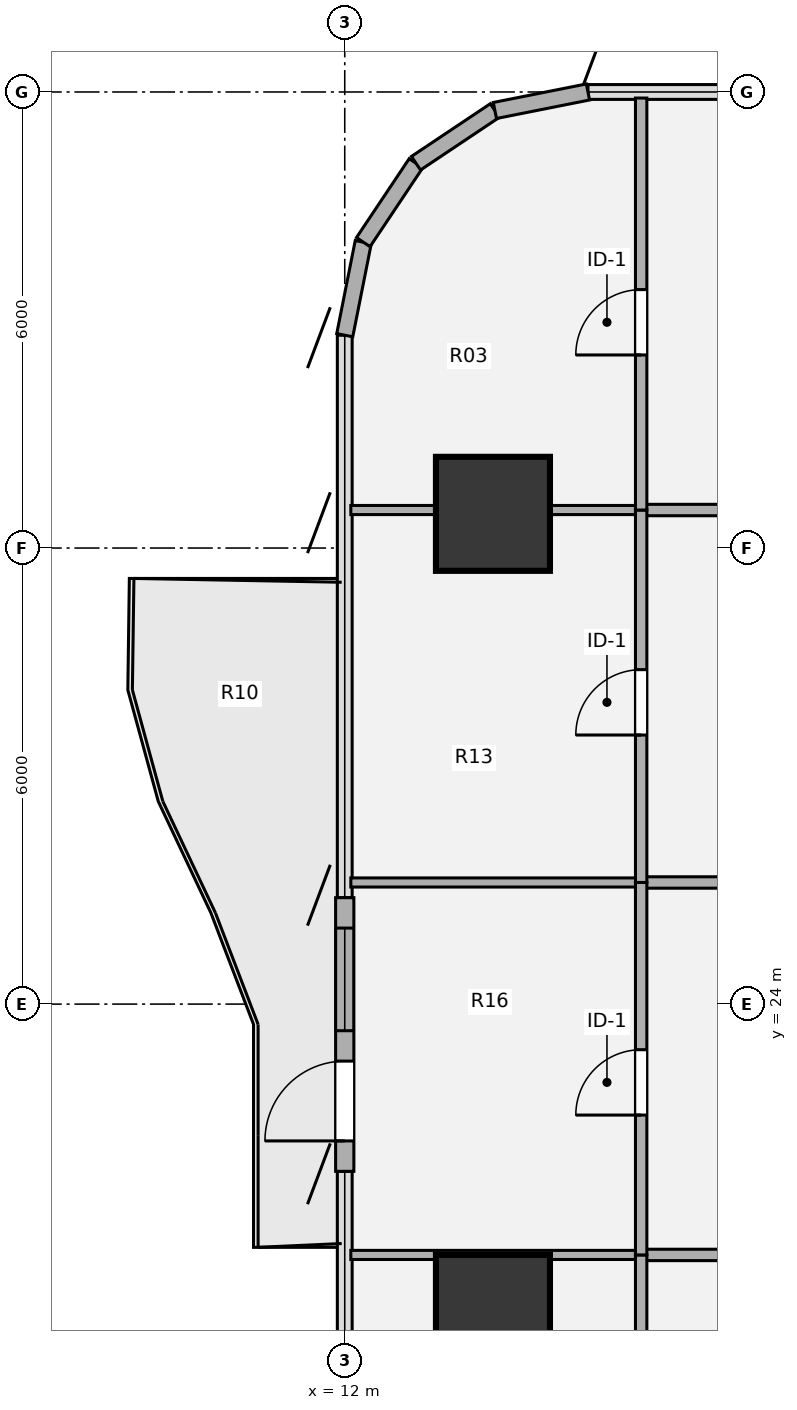
"""IFC4 building model, lengths in metres.
Left out: names, types, materials, properties, quantities, classifications, styles, units other than length and angle.
Written with IfcOpenShell. Run it as: python <this file> out.ifc"""

import sys

from ifc_helpers import new_model, si_unit, direction, frame, frame_2d, origin, origin_2d, place, context, subcontext, project, spatial, rectangle, hollow_circle, extrude, source, transform, mapped, element, fill, save


model = new_model("IFC4")
c1 = context("Model", 3, precision=1e-05, world=origin(), true_north=direction((0.0, 1.0)))
c2 = subcontext(c1, "Body", "Model", "MODEL_VIEW")
j1 = project(units=[si_unit("LENGTHUNIT", "METRE"), si_unit("PLANEANGLEUNIT", "RADIAN")], contexts=[c1])
p1 = place(None, origin())
s1 = spatial("IfcSite", under=j1, at=p1, CompositionType="ELEMENT")
p2 = place(p1, origin())
s2 = spatial("IfcBuilding", under=s1, at=p2, CompositionType="ELEMENT")
p3 = place(p2, frame((0.0, 0.0, 68.58)))
s3 = spatial("IfcBuildingStorey", under=s2, at=p3, CompositionType="ELEMENT", Elevation=68.58)
m1 = source(origin(), c2, "Body", "SweptSolid", [
    extrude(hollow_circle(Radius=0.75, WallThickness=0.05, at=origin_2d()), origin(), (0.0, 0.0, 1.0), 3.78),
])
for number, where, z_axis, x_axis in (
    (1, (13.95, 19.95, 0.0), (0.0, 0.0, 1.0), (1.0, 0.0, 0.0)),
    (2, (13.95, 30.45, 0.0), (0.0, 0.0, 1.0), (1.0, 0.0, 0.0)),
):
    element("IfcColumn", number, at=place(p3, frame(where, z_axis=z_axis, x_axis=x_axis)), inside=s3, PredefinedType="COLUMN", context=c2, shape_type="MappedRepresentation", body=[
        mapped(m1, transform((0.0, 0.0, 0.0), x_axis=(1.0, 0.0, 0.0), y_axis=(0.0, 1.0, 0.0), z_axis=(0.0, 0.0, 1.0), scale=1.0)),
    ])
p4 = place(p3, frame((12.0, 21.8, 0.0), z_axis=(0.0, 0.0, 1.0), x_axis=(0.0, 1.0, 0.0)))
e3 = element("IfcWall", 3, at=p4, inside=s3, PredefinedType="SOLIDWALL", context=c2, shape_type="SweptSolid", body=[
    extrude(rectangle(XDim=3.6, YDim=0.24, at=frame_2d((1.8, 0.0))), origin(), (0.0, 0.0, 1.0), 3.53),
])
p5 = place(p4, frame((0.4, 0.0, 0.0)))
e4 = element("IfcOpeningElement", 4, at=p5, cuts=e3, PredefinedType="OPENING", context=c2, shape_type="SweptSolid", body=[
    extrude(rectangle(XDim=1.05, YDim=2.15, at=origin_2d()), frame((0.525, 0.13, 1.075), z_axis=(0.0, -1.0, 0.0), x_axis=(1.0, 0.0, 0.0)), (0.0, 0.0, 1.0), 0.26),
])
p6 = place(p4, frame((1.85, 0.0, 0.85)))
e5 = element("IfcOpeningElement", 5, at=p6, cuts=e3, PredefinedType="OPENING", context=c2, shape_type="SweptSolid", body=[
    extrude(rectangle(XDim=1.35, YDim=1.35, at=origin_2d()), frame((0.675, 0.13, 0.675), z_axis=(0.0, -1.0, 0.0), x_axis=(1.0, 0.0, 0.0)), (0.0, 0.0, 1.0), 0.26),
])
for number, where, z_axis, x_axis in (
    (6, (12.0, 32.8, 0.0), (0.0, 0.0, 1.0), (0.195, 0.981, 0.0)),
    (7, (12.244, 34.025, 0.0), (0.0, 0.0, 1.0), (0.556, 0.831, 0.0)),
    (8, (12.937, 35.063, 0.0), (0.0, 0.0, 1.0), (0.831, 0.556, 0.0)),
    (9, (13.975, 35.756, 0.0), (0.0, 0.0, 1.0), (0.981, 0.195, 0.0)),
):
    element("IfcWall", number, at=place(p3, frame(where, z_axis=z_axis, x_axis=x_axis)), inside=s3, PredefinedType="SOLIDWALL", context=c2, shape_type="SweptSolid", body=[
        extrude(rectangle(XDim=1.249, YDim=0.215, at=frame_2d((0.624, 0.0))), origin(), (0.0, 0.0, 1.0), 3.53),
    ])
p7 = place(p3, frame((12.08, 20.7, 0.0), z_axis=(0.0, 0.0, 1.0), x_axis=(1.0, 0.0, 0.0)))
e10 = element("IfcWall", 10, at=p7, inside=s3, PredefinedType="PARTITIONING", context=c2, shape_type="SweptSolid", body=[
    extrude(rectangle(XDim=3.82, YDim=0.12, at=frame_2d((1.91, 0.0))), origin(), (0.0, 0.0, 1.0), 2.982),
])
p8 = place(p3, frame((15.9, 20.7, 0.0), z_axis=(0.0, 0.0, 1.0), x_axis=(1.0, 0.0, 0.0)))
e11 = element("IfcWall", 11, at=p8, inside=s3, PredefinedType="PARTITIONING", context=c2, shape_type="SweptSolid", body=[
    extrude(rectangle(XDim=6.2, YDim=0.15, at=frame_2d((3.1, 0.0))), origin(), (0.0, 0.0, 1.0), 2.982),
])
p9 = place(p3, frame((12.08, 25.6, 0.0), z_axis=(0.0, 0.0, 1.0), x_axis=(1.0, 0.0, 0.0)))
e12 = element("IfcWall", 12, at=p9, inside=s3, PredefinedType="PARTITIONING", context=c2, shape_type="SweptSolid", body=[
    extrude(rectangle(XDim=3.82, YDim=0.12, at=frame_2d((1.91, 0.0))), origin(), (0.0, 0.0, 1.0), 2.982),
])
p10 = place(p3, frame((15.9, 25.6, 0.0), z_axis=(0.0, 0.0, 1.0), x_axis=(1.0, 0.0, 0.0)))
e13 = element("IfcWall", 13, at=p10, inside=s3, PredefinedType="PARTITIONING", context=c2, shape_type="SweptSolid", body=[
    extrude(rectangle(XDim=6.2, YDim=0.15, at=frame_2d((3.1, 0.0))), origin(), (0.0, 0.0, 1.0), 2.982),
])
p11 = place(p3, frame((12.08, 30.5, 0.0), z_axis=(0.0, 0.0, 1.0), x_axis=(1.0, 0.0, 0.0)))
e14 = element("IfcWall", 14, at=p11, inside=s3, PredefinedType="PARTITIONING", context=c2, shape_type="SweptSolid", body=[
    extrude(rectangle(XDim=3.82, YDim=0.12, at=frame_2d((1.91, 0.0))), origin(), (0.0, 0.0, 1.0), 2.903),
])
p12 = place(p3, frame((15.9, 30.5, 0.0), z_axis=(0.0, 0.0, 1.0), x_axis=(1.0, 0.0, 0.0)))
e15 = element("IfcWall", 15, at=p12, inside=s3, PredefinedType="PARTITIONING", context=c2, shape_type="SweptSolid", body=[
    extrude(rectangle(XDim=6.2, YDim=0.15, at=frame_2d((3.1, 0.0))), origin(), (0.0, 0.0, 1.0), 2.903),
])
p13 = place(p3, frame((15.9, 15.8, 0.0), z_axis=(0.0, 0.0, 1.0), x_axis=(0.0, 1.0, 0.0)))
e16 = element("IfcWall", 16, at=p13, inside=s3, PredefinedType="PARTITIONING", context=c2, shape_type="SweptSolid", body=[
    extrude(rectangle(XDim=4.9, YDim=0.15, at=frame_2d((2.45, 0.0))), origin(), (0.0, 0.0, 1.0), 3.5),
])
p14 = place(p13, frame((1.74, 0.0, 0.0)))
e17 = element("IfcOpeningElement", 17, at=p14, cuts=e16, PredefinedType="OPENING", context=c2, shape_type="SweptSolid", body=[
    extrude(rectangle(XDim=0.86, YDim=2.1, at=origin_2d()), frame((0.43, 0.085, 1.05), z_axis=(0.0, -1.0, 0.0), x_axis=(1.0, 0.0, 0.0)), (0.0, 0.0, 1.0), 0.17),
])
p15 = place(p3, frame((15.9, 20.7, 0.0), z_axis=(0.0, 0.0, 1.0), x_axis=(0.0, 1.0, 0.0)))
e18 = element("IfcWall", 18, at=p15, inside=s3, PredefinedType="PARTITIONING", context=c2, shape_type="SweptSolid", body=[
    extrude(rectangle(XDim=4.9, YDim=0.15, at=frame_2d((2.45, 0.0))), origin(), (0.0, 0.0, 1.0), 3.5),
])
p16 = place(p15, frame((1.84, 0.0, 0.0)))
e19 = element("IfcOpeningElement", 19, at=p16, cuts=e18, PredefinedType="OPENING", context=c2, shape_type="SweptSolid", body=[
    extrude(rectangle(XDim=0.86, YDim=2.1, at=origin_2d()), frame((0.43, 0.085, 1.05), z_axis=(0.0, -1.0, 0.0), x_axis=(1.0, 0.0, 0.0)), (0.0, 0.0, 1.0), 0.17),
])
p17 = place(p3, frame((15.9, 25.6, 0.0), z_axis=(0.0, 0.0, 1.0), x_axis=(0.0, 1.0, 0.0)))
e20 = element("IfcWall", 20, at=p17, inside=s3, PredefinedType="PARTITIONING", context=c2, shape_type="SweptSolid", body=[
    extrude(rectangle(XDim=4.9, YDim=0.15, at=frame_2d((2.45, 0.0))), origin(), (0.0, 0.0, 1.0), 3.5),
])
p18 = place(p17, frame((1.94, 0.0, 0.0)))
e21 = element("IfcOpeningElement", 21, at=p18, cuts=e20, PredefinedType="OPENING", context=c2, shape_type="SweptSolid", body=[
    extrude(rectangle(XDim=0.86, YDim=2.1, at=origin_2d()), frame((0.43, 0.085, 1.05), z_axis=(0.0, -1.0, 0.0), x_axis=(1.0, 0.0, 0.0)), (0.0, 0.0, 1.0), 0.17),
])
p19 = place(p3, frame((15.9, 30.5, 0.0), z_axis=(0.0, 0.0, 1.0), x_axis=(0.0, 1.0, 0.0)))
e22 = element("IfcWall", 22, at=p19, inside=s3, PredefinedType="PARTITIONING", context=c2, shape_type="SweptSolid", body=[
    extrude(rectangle(XDim=5.42, YDim=0.15, at=frame_2d((2.71, 0.0))), origin(), (0.0, 0.0, 1.0), 3.5),
])
p20 = place(p19, frame((2.04, 0.0, 0.0)))
e23 = element("IfcOpeningElement", 23, at=p20, cuts=e22, PredefinedType="OPENING", context=c2, shape_type="SweptSolid", body=[
    extrude(rectangle(XDim=0.86, YDim=2.1, at=origin_2d()), frame((0.43, 0.085, 1.05), z_axis=(0.0, -1.0, 0.0), x_axis=(1.0, 0.0, 0.0)), (0.0, 0.0, 1.0), 0.17),
])
m2 = source(origin(), c2, "Body", "SweptSolid", [
    extrude(rectangle(XDim=1.05, YDim=2.15, at=origin_2d()), frame((0.525, 0.025, 1.075), z_axis=(0.0, -1.0, 0.0), x_axis=(1.0, 0.0, 0.0)), (0.0, 0.0, 1.0), 0.05),
])
p21 = place(p5, origin())
e24 = element("IfcDoor", 24, at=p21, inside=s3, OperationType="SINGLE_SWING_LEFT", PredefinedType="DOOR", context=c2, shape_type="MappedRepresentation", body=[
    mapped(m2, transform((0.0, 0.0, 0.0), x_axis=(1.0, 0.0, 0.0), y_axis=(0.0, 1.0, 0.0), z_axis=(0.0, 0.0, 1.0), scale=1.0)),
])
fill(e4, e24)
m3 = source(origin(), c2, "Body", "SweptSolid", [
    extrude(rectangle(XDim=1.35, YDim=1.35, at=origin_2d()), frame((0.675, 0.03, 0.675), z_axis=(0.0, -1.0, 0.0), x_axis=(1.0, 0.0, 0.0)), (0.0, 0.0, 1.0), 0.06),
])
p22 = place(p6, origin())
e25 = element("IfcWindow", 25, at=p22, inside=s3, PartitioningType="SINGLE_PANEL", PredefinedType="WINDOW", context=c2, shape_type="MappedRepresentation", body=[
    mapped(m3, transform((0.0, 0.0, 0.0), x_axis=(1.0, 0.0, 0.0), y_axis=(0.0, 1.0, 0.0), z_axis=(0.0, 0.0, 1.0), scale=1.0)),
])
fill(e5, e25)
m4 = source(origin(), c2, "Body", "SweptSolid", [
    extrude(rectangle(XDim=0.86, YDim=2.1, at=origin_2d()), frame((0.43, 0.025, 1.05), z_axis=(0.0, -1.0, 0.0), x_axis=(1.0, 0.0, 0.0)), (0.0, 0.0, 1.0), 0.05),
])
p23 = place(p16, origin())
e26 = element("IfcDoor", 26, at=p23, inside=s3, OperationType="SINGLE_SWING_LEFT", PredefinedType="DOOR", context=c2, shape_type="MappedRepresentation", body=[
    mapped(m4, transform((0.0, 0.0, 0.0), x_axis=(1.0, 0.0, 0.0), y_axis=(0.0, 1.0, 0.0), z_axis=(0.0, 0.0, 1.0), scale=1.0)),
])
fill(e19, e26)
p24 = place(p18, origin())
e27 = element("IfcDoor", 27, at=p24, inside=s3, OperationType="SINGLE_SWING_LEFT", PredefinedType="DOOR", context=c2, shape_type="MappedRepresentation", body=[
    mapped(m4, transform((0.0, 0.0, 0.0), x_axis=(1.0, 0.0, 0.0), y_axis=(0.0, 1.0, 0.0), z_axis=(0.0, 0.0, 1.0), scale=1.0)),
])
fill(e21, e27)
p25 = place(p20, origin())
e28 = element("IfcDoor", 28, at=p25, inside=s3, OperationType="SINGLE_SWING_LEFT", PredefinedType="DOOR", context=c2, shape_type="MappedRepresentation", body=[
    mapped(m4, transform((0.0, 0.0, 0.0), x_axis=(1.0, 0.0, 0.0), y_axis=(0.0, 1.0, 0.0), z_axis=(0.0, 0.0, 1.0), scale=1.0)),
])
fill(e23, e28)
save(model, sys.argv[1])
